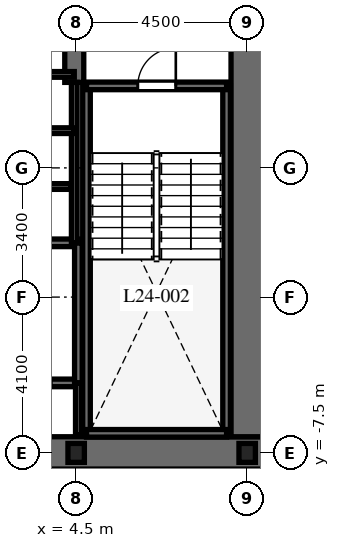
"""IFC4 building model, lengths in metres.
Left out: names, types, materials, properties, quantities, classifications, styles, units other than length and angle.
Written with IfcOpenShell. Run it as: python <this file> out.ifc"""

import sys

from ifc_helpers import new_model, si_unit, direction, frame, frame_2d, origin, origin_2d, place, context, subcontext, project, spatial, rectangle, i_section, extrude, element, fill, save


model = new_model("IFC4")
c1 = context("Model", 3, precision=1e-05, world=origin(), true_north=direction((0.0, 1.0)))
c2 = subcontext(c1, "Body", "Model", "MODEL_VIEW")
j1 = project(units=[si_unit("LENGTHUNIT", "METRE"), si_unit("PLANEANGLEUNIT", "RADIAN")], contexts=[c1])
p1 = place(None, origin())
s1 = spatial("IfcSite", under=j1, at=p1, CompositionType="ELEMENT")
p2 = place(p1, origin())
s2 = spatial("IfcBuilding", under=s1, at=p2, CompositionType="ELEMENT")
p3 = place(p2, frame((0.0, 0.0, 102.5)))
s3 = spatial("IfcBuildingStorey", under=s2, at=p3, CompositionType="ELEMENT", Elevation=102.5)
p4 = place(p3, frame((-9.425, -7.5, 0.0), z_axis=(0.0, 0.0, 1.0), x_axis=(1.0, 0.0, 0.0)))
e1 = element("IfcWall", 1, at=p4, inside=s3, PredefinedType="SHEAR", context=c2, shape_type="SweptSolid", body=[
    extrude(rectangle(XDim=18.85, YDim=0.85, at=frame_2d((9.425, 0.0))), origin(), (0.0, 0.0, 1.0), 3.7),
])
p5 = place(p4, frame((9.475, 0.0, 0.0)))
e2 = element("IfcOpeningElement", 2, at=p5, cuts=e1, PredefinedType="OPENING", context=c2, shape_type="SweptSolid", body=[
    extrude(rectangle(XDim=1.0, YDim=2.15, at=frame_2d((0.5, 1.075))), frame((0.0, 0.435, 0.0), z_axis=(0.0, -1.0, 0.0), x_axis=(1.0, 0.0, 0.0)), (0.0, 0.0, 1.0), 0.87),
])
p6 = place(p3, frame((9.0, -7.075, 0.0), z_axis=(0.0, 0.0, 1.0), x_axis=(0.0, 1.0, 0.0)))
e3 = element("IfcWall", 3, at=p6, inside=s3, PredefinedType="SHEAR", context=c2, shape_type="SweptSolid", body=[
    extrude(rectangle(XDim=14.15, YDim=0.85, at=frame_2d((7.075, 0.0))), origin(), (0.0, 0.0, 1.0), 3.7),
])
p7 = place(p6, frame((10.2, 0.0, 0.0)))
e4 = element("IfcOpeningElement", 4, at=p7, cuts=e3, PredefinedType="OPENING", context=c2, shape_type="SweptSolid", body=[
    extrude(rectangle(XDim=1.05, YDim=2.15, at=frame_2d((0.525, 1.075))), frame((0.0, 0.435, 0.0), z_axis=(0.0, -1.0, 0.0), x_axis=(1.0, 0.0, 0.0)), (0.0, 0.0, 1.0), 0.87),
])
p8 = place(p3, frame((4.45, 2.25, 0.0), z_axis=(0.0, 0.0, 1.0), x_axis=(0.0, 1.0, 0.0)))
e5 = element("IfcWall", 5, at=p8, inside=s3, PredefinedType="SHEAR", context=c2, shape_type="SweptSolid", body=[
    extrude(rectangle(XDim=4.825, YDim=0.5, at=frame_2d((2.413, 0.0))), origin(), (0.0, 0.0, 1.0), 3.7),
])
for number, where, z_axis, x_axis in (
    (6, (4.772, -6.985, 0.0), (0.0, 0.0, 1.0), (0.0, 1.0, 0.0)),
    (7, (8.458, -6.985, 0.0), (0.0, 0.0, 1.0), (0.0, 1.0, 0.0)),
):
    element("IfcWall", number, at=place(p3, frame(where, z_axis=z_axis, x_axis=x_axis)), inside=s3, PredefinedType="SHEAR", context=c2, shape_type="SweptSolid", body=[
        extrude(rectangle(XDim=9.143, YDim=0.2, at=frame_2d((4.572, 0.0))), origin(), (0.0, 0.0, 1.0), 3.7),
    ])
p9 = place(p3, frame((4.772, -6.985, 0.0), z_axis=(0.0, 0.0, 1.0), x_axis=(1.0, 0.0, 0.0)))
e8 = element("IfcWall", 8, at=p9, inside=s3, PredefinedType="SHEAR", context=c2, shape_type="SweptSolid", body=[
    extrude(rectangle(XDim=3.686, YDim=0.2, at=frame_2d((1.843, 0.0))), origin(), (0.0, 0.0, 1.0), 3.7),
])
p10 = place(p3, frame((4.772, 2.158, 0.0), z_axis=(0.0, 0.0, 1.0), x_axis=(1.0, 0.0, 0.0)))
e9 = element("IfcWall", 9, at=p10, inside=s3, PredefinedType="SHEAR", context=c2, shape_type="SweptSolid", body=[
    extrude(rectangle(XDim=3.686, YDim=0.2, at=frame_2d((1.843, 0.0))), origin(), (0.0, 0.0, 1.0), 3.7),
])
p11 = place(p10, frame((1.35, 0.0, 0.0)))
e10 = element("IfcOpeningElement", 10, at=p11, cuts=e9, PredefinedType="OPENING", context=c2, shape_type="SweptSolid", body=[
    extrude(rectangle(XDim=1.0, YDim=2.15, at=frame_2d((0.5, 1.075))), frame((0.0, 0.11, 0.0), z_axis=(0.0, -1.0, 0.0), x_axis=(1.0, 0.0, 0.0)), (0.0, 0.0, 1.0), 0.22),
])
p12 = place(p3, frame((-4.608, -5.658, 0.0), z_axis=(0.0, 0.0, 1.0), x_axis=(1.0, 0.0, 0.0)))
e11 = element("IfcWall", 11, at=p12, inside=s3, PredefinedType="SHEAR", context=c2, shape_type="SweptSolid", body=[
    extrude(rectangle(XDim=9.166, YDim=0.2, at=frame_2d((4.583, 0.0))), origin(), (0.0, 0.0, 1.0), 3.7),
])
p13 = place(p12, frame((7.45, 0.0, 0.0)))
e12 = element("IfcOpeningElement", 12, at=p13, cuts=e11, PredefinedType="OPENING", context=c2, shape_type="SweptSolid", body=[
    extrude(rectangle(XDim=1.0, YDim=2.15, at=frame_2d((0.5, 1.075))), frame((0.0, 0.11, 0.0), z_axis=(0.0, -1.0, 0.0), x_axis=(1.0, 0.0, 0.0)), (0.0, 0.0, 1.0), 0.22),
])
p14 = place(p3, frame((-4.608, -1.972, 0.0), z_axis=(0.0, 0.0, 1.0), x_axis=(1.0, 0.0, 0.0)))
e13 = element("IfcWall", 13, at=p14, inside=s3, PredefinedType="SHEAR", context=c2, shape_type="SweptSolid", body=[
    extrude(rectangle(XDim=9.166, YDim=0.2, at=frame_2d((4.583, 0.0))), origin(), (0.0, 0.0, 1.0), 3.7),
])
p15 = place(p3, frame((4.558, -5.658, 0.0), z_axis=(0.0, 0.0, 1.0), x_axis=(0.0, 1.0, 0.0)))
e14 = element("IfcWall", 14, at=p15, inside=s3, PredefinedType="SHEAR", context=c2, shape_type="SweptSolid", body=[
    extrude(rectangle(XDim=3.686, YDim=0.2, at=frame_2d((1.843, 0.0))), origin(), (0.0, 0.0, 1.0), 3.7),
])
for number, where, z_axis, x_axis in (
    (15, (4.5, -7.5, 0.0), (0.0, 0.0, 1.0), (1.0, 0.0, 0.0)),
    (16, (9.0, -7.5, 0.0), (0.0, 0.0, 1.0), (1.0, 0.0, 0.0)),
):
    element("IfcColumn", number, at=place(p3, frame(where, z_axis=z_axis, x_axis=x_axis)), inside=s3, PredefinedType="COLUMN", context=c2, shape_type="SweptSolid", body=[
        extrude(i_section(OverallWidth=0.432, OverallDepth=0.498, WebThickness=0.056, FlangeThickness=0.089, at=origin_2d()), origin(), (0.0, 0.0, 1.0), 3.7),
    ])
p16 = place(p3, frame((4.558, -7.02, 0.0), z_axis=(0.0, 0.0, 1.0), x_axis=(0.0, 1.0, 0.0)))
e17 = element("IfcWall", 17, at=p16, inside=s3, PredefinedType="PARTITIONING", context=c2, shape_type="SweptSolid", body=[
    extrude(rectangle(XDim=1.362, YDim=0.15, at=frame_2d((0.681, 0.0))), origin(), (0.0, 0.0, 1.0), 3.4),
])
p17 = place(p3, frame((4.45, -1.972, 0.0), z_axis=(0.0, 0.0, 1.0), x_axis=(0.0, 1.0, 0.0)))
e18 = element("IfcWall", 18, at=p17, inside=s3, PredefinedType="PARTITIONING", context=c2, shape_type="SweptSolid", body=[
    extrude(rectangle(XDim=4.222, YDim=0.15, at=frame_2d((2.111, 0.0))), origin(), (0.0, 0.0, 1.0), 3.4),
])
for number, where, z_axis, x_axis in (
    (19, (1.9, 0.98, 0.0), (0.0, 0.0, 1.0), (1.0, 0.0, 0.0)),
    (20, (1.9, 2.46, 0.0), (0.0, 0.0, 1.0), (1.0, 0.0, 0.0)),
):
    element("IfcWall", number, at=place(p3, frame(where, z_axis=z_axis, x_axis=x_axis)), inside=s3, PredefinedType="PARTITIONING", context=c2, shape_type="SweptSolid", body=[
        extrude(rectangle(XDim=2.55, YDim=0.15, at=frame_2d((1.275, 0.0))), origin(), (0.0, 0.0, 1.0), 3.4),
    ])
p18 = place(p3, frame((-4.36, -0.49, 0.0), z_axis=(0.0, 0.0, 1.0), x_axis=(1.0, 0.0, 0.0)))
e21 = element("IfcWall", 21, at=p18, inside=s3, PredefinedType="PARTITIONING", context=c2, shape_type="SweptSolid", body=[
    extrude(rectangle(XDim=8.72, YDim=0.15, at=frame_2d((4.36, 0.0))), origin(), (0.0, 0.0, 1.0), 3.4),
])
p19 = place(p18, frame((3.86, 0.0, 0.0)))
e22 = element("IfcOpeningElement", 22, at=p19, cuts=e21, PredefinedType="OPENING", context=c2, shape_type="SweptSolid", body=[
    extrude(rectangle(XDim=0.9, YDim=2.03, at=frame_2d((0.45, 1.015))), frame((0.0, 0.085, 0.0), z_axis=(0.0, -1.0, 0.0), x_axis=(1.0, 0.0, 0.0)), (0.0, 0.0, 1.0), 0.17),
])
p20 = place(p11, origin())
e23 = element("IfcDoor", 23, at=p20, inside=s3, OperationType="SINGLE_SWING_RIGHT", PredefinedType="DOOR", context=c2, shape_type="SweptSolid", body=[
    extrude(rectangle(XDim=1.0, YDim=2.15, at=frame_2d((0.5, 1.075))), frame((0.0, 0.025, 0.0), z_axis=(0.0, -1.0, 0.0), x_axis=(1.0, 0.0, 0.0)), (0.0, 0.0, 1.0), 0.05),
])
fill(e10, e23)
save(model, sys.argv[1])
